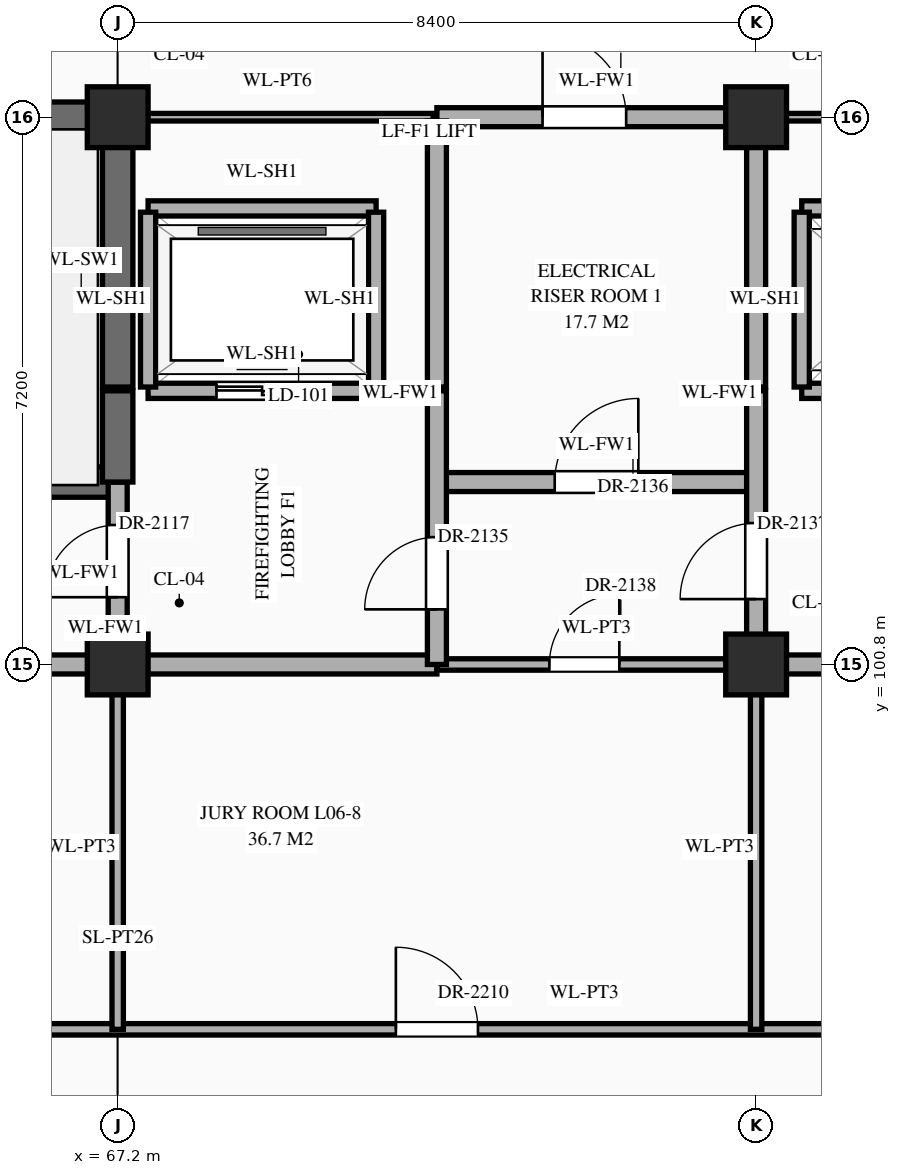
"""IFC4 building model, lengths in metres.
Left out: names, types, materials, properties, quantities, classifications, styles, units other than length and angle.
Written with IfcOpenShell. Run it as: python <this file> out.ifc"""

import sys

from ifc_helpers import new_model, si_unit, direction, frame, frame_2d, origin, origin_2d, place, context, subcontext, project, spatial, rectangle, extrude, element, fill, save


model = new_model("IFC4")
c1 = context("Model", 3, precision=1e-05, world=origin(), true_north=direction((0.0, 1.0)))
c2 = subcontext(c1, "Body", "Model", "MODEL_VIEW")
j1 = project(units=[si_unit("LENGTHUNIT", "METRE"), si_unit("PLANEANGLEUNIT", "RADIAN")], contexts=[c1])
p1 = place(None, origin())
s1 = spatial("IfcSite", under=j1, at=p1, CompositionType="ELEMENT")
p2 = place(p1, origin())
s2 = spatial("IfcBuilding", under=s1, at=p2, CompositionType="ELEMENT")
p3 = place(p2, frame((0.0, 0.0, 26.1)))
s3 = spatial("IfcBuildingStorey", under=s2, at=p3, CompositionType="ELEMENT", Elevation=26.1)
for number, where, z_axis, x_axis in (
    (1, (67.2, 100.8, 0.0), (0.0, 0.0, 1.0), (1.0, 0.0, 0.0)),
    (2, (67.2, 108.0, 0.0), (0.0, 0.0, 1.0), (1.0, 0.0, 0.0)),
    (3, (75.6, 100.8, 0.0), (0.0, 0.0, 1.0), (1.0, 0.0, 0.0)),
    (4, (75.6, 108.0, 0.0), (0.0, 0.0, 1.0), (1.0, 0.0, 0.0)),
):
    element("IfcColumn", number, at=place(p3, frame(where, z_axis=z_axis, x_axis=x_axis)), inside=s3, PredefinedType="COLUMN", context=c2, shape_type="SweptSolid", body=[
        extrude(rectangle(XDim=0.8, YDim=0.8, at=origin_2d()), origin(), (0.0, 0.0, 1.0), 4.5),
    ])
p4 = place(p3, frame((56.2, 96.0, 0.0), z_axis=(0.0, 0.0, 1.0), x_axis=(1.0, 0.0, 0.0)))
e5 = element("IfcWall", 5, at=p4, inside=s3, PredefinedType="STANDARD", context=c2, shape_type="SweptSolid", body=[
    extrude(rectangle(XDim=27.8, YDim=0.15, at=frame_2d((13.9, 0.0))), origin(), (0.0, 0.0, 1.0), 4.24),
])
p5 = place(p4, frame((0.8, 0.0, 0.0)))
e6 = element("IfcOpeningElement", 6, at=p5, cuts=e5, PredefinedType="OPENING", context=c2, shape_type="SweptSolid", body=[
    extrude(rectangle(XDim=1.0, YDim=2.25, at=frame_2d((0.5, 1.125))), frame((0.0, 0.087, 0.0), z_axis=(0.0, -1.0, 0.0), x_axis=(1.0, 0.0, 0.0)), (0.0, 0.0, 1.0), 0.174),
])
p6 = place(p4, frame((6.28, 0.0, 0.0)))
e7 = element("IfcOpeningElement", 7, at=p6, cuts=e5, PredefinedType="OPENING", context=c2, shape_type="SweptSolid", body=[
    extrude(rectangle(XDim=1.04, YDim=2.2, at=frame_2d((0.52, 1.1))), frame((0.0, 0.087, 0.0), z_axis=(0.0, -1.0, 0.0), x_axis=(1.0, 0.0, 0.0)), (0.0, 0.0, 1.0), 0.174),
])
p7 = place(p4, frame((14.66, 0.0, 0.0)))
e8 = element("IfcOpeningElement", 8, at=p7, cuts=e5, PredefinedType="OPENING", context=c2, shape_type="SweptSolid", body=[
    extrude(rectangle(XDim=1.08, YDim=2.25, at=frame_2d((0.54, 1.125))), frame((0.0, 0.087, 0.0), z_axis=(0.0, -1.0, 0.0), x_axis=(1.0, 0.0, 0.0)), (0.0, 0.0, 1.0), 0.174),
])
p8 = place(p4, frame((23.04, 0.0, 0.0)))
e9 = element("IfcOpeningElement", 9, at=p8, cuts=e5, PredefinedType="OPENING", context=c2, shape_type="SweptSolid", body=[
    extrude(rectangle(XDim=1.12, YDim=2.25, at=frame_2d((0.56, 1.125))), frame((0.0, 0.087, 0.0), z_axis=(0.0, -1.0, 0.0), x_axis=(1.0, 0.0, 0.0)), (0.0, 0.0, 1.0), 0.174),
])
p9 = place(p3, frame((58.8, 100.8, 0.0), z_axis=(0.0, 0.0, 1.0), x_axis=(1.0, 0.0, 0.0)))
e10 = element("IfcWall", 10, at=p9, inside=s3, PredefinedType="STANDARD", context=c2, shape_type="SweptSolid", body=[
    extrude(rectangle(XDim=12.6, YDim=0.25, at=frame_2d((6.3, 0.0))), origin(), (0.0, 0.0, 1.0), 3.39),
])
p10 = place(p9, frame((3.7, 0.0, 0.0)))
e11 = element("IfcOpeningElement", 11, at=p10, cuts=e10, PredefinedType="OPENING", context=c2, shape_type="SweptSolid", body=[
    extrude(rectangle(XDim=1.0, YDim=2.2, at=frame_2d((0.5, 1.1))), frame((0.0, 0.137, 0.0), z_axis=(0.0, -1.0, 0.0), x_axis=(1.0, 0.0, 0.0)), (0.0, 0.0, 1.0), 0.274),
])
p11 = place(p3, frame((71.4, 100.8, 0.0), z_axis=(0.0, 0.0, 1.0), x_axis=(1.0, 0.0, 0.0)))
e12 = element("IfcWall", 12, at=p11, inside=s3, PredefinedType="STANDARD", context=c2, shape_type="SweptSolid", body=[
    extrude(rectangle(XDim=4.2, YDim=0.15, at=frame_2d((2.1, 0.0))), origin(), (0.0, 0.0, 1.0), 3.39),
])
p12 = place(p11, frame((1.48, 0.0, 0.0)))
e13 = element("IfcOpeningElement", 13, at=p12, cuts=e12, PredefinedType="OPENING", context=c2, shape_type="SweptSolid", body=[
    extrude(rectangle(XDim=0.92, YDim=2.15, at=frame_2d((0.46, 1.075))), frame((0.0, 0.087, 0.0), z_axis=(0.0, -1.0, 0.0), x_axis=(1.0, 0.0, 0.0)), (0.0, 0.0, 1.0), 0.174),
])
p13 = place(p3, frame((75.6, 100.8, 0.0), z_axis=(0.0, 0.0, 1.0), x_axis=(1.0, 0.0, 0.0)))
e14 = element("IfcWall", 14, at=p13, inside=s3, PredefinedType="STANDARD", context=c2, shape_type="SweptSolid", body=[
    extrude(rectangle(XDim=16.8, YDim=0.25, at=frame_2d((8.4, 0.0))), origin(), (0.0, 0.0, 1.0), 3.39),
])
p14 = place(p13, frame((3.725, 0.0, 0.0)))
e15 = element("IfcOpeningElement", 15, at=p14, cuts=e14, PredefinedType="OPENING", context=c2, shape_type="SweptSolid", body=[
    extrude(rectangle(XDim=0.95, YDim=2.15, at=frame_2d((0.475, 1.075))), frame((0.0, 0.137, 0.0), z_axis=(0.0, -1.0, 0.0), x_axis=(1.0, 0.0, 0.0)), (0.0, 0.0, 1.0), 0.274),
])
p15 = place(p13, frame((9.76, 0.0, 0.0)))
e16 = element("IfcOpeningElement", 16, at=p15, cuts=e14, PredefinedType="OPENING", context=c2, shape_type="SweptSolid", body=[
    extrude(rectangle(XDim=1.0, YDim=2.2, at=frame_2d((0.5, 1.1))), frame((0.0, 0.137, 0.0), z_axis=(0.0, -1.0, 0.0), x_axis=(1.0, 0.0, 0.0)), (0.0, 0.0, 1.0), 0.274),
])
p16 = place(p13, frame((12.525, 0.0, 0.0)))
e17 = element("IfcOpeningElement", 17, at=p16, cuts=e14, PredefinedType="OPENING", context=c2, shape_type="SweptSolid", body=[
    extrude(rectangle(XDim=0.95, YDim=2.15, at=frame_2d((0.475, 1.075))), frame((0.0, 0.137, 0.0), z_axis=(0.0, -1.0, 0.0), x_axis=(1.0, 0.0, 0.0)), (0.0, 0.0, 1.0), 0.274),
])
p17 = place(p13, frame((14.79, 0.0, 0.0)))
e18 = element("IfcOpeningElement", 18, at=p17, cuts=e14, PredefinedType="OPENING", context=c2, shape_type="SweptSolid", body=[
    extrude(rectangle(XDim=1.1, YDim=2.2, at=frame_2d((0.55, 1.1))), frame((0.0, 0.137, 0.0), z_axis=(0.0, -1.0, 0.0), x_axis=(1.0, 0.0, 0.0)), (0.0, 0.0, 1.0), 0.274),
])
p18 = place(p3, frame((58.8, 103.2, 0.0), z_axis=(0.0, 0.0, 1.0), x_axis=(1.0, 0.0, 0.0)))
e19 = element("IfcWall", 19, at=p18, inside=s3, PredefinedType="SHEAR", context=c2, shape_type="SweptSolid", body=[
    extrude(rectangle(XDim=8.4, YDim=0.4, at=frame_2d((4.2, 0.0))), origin(), (0.0, 0.0, 1.0), 4.24),
])
p19 = place(p18, frame((0.65, 0.0, 0.0)))
e20 = element("IfcOpeningElement", 20, at=p19, cuts=e19, PredefinedType="OPENING", context=c2, shape_type="SweptSolid", body=[
    extrude(rectangle(XDim=1.1, YDim=2.2, at=frame_2d((0.55, 1.1))), frame((0.0, 0.212, 0.0), z_axis=(0.0, -1.0, 0.0), x_axis=(1.0, 0.0, 0.0)), (0.0, 0.0, 1.0), 0.424),
])
p20 = place(p3, frame((71.4, 103.2, 0.0), z_axis=(0.0, 0.0, 1.0), x_axis=(1.0, 0.0, 0.0)))
e21 = element("IfcWall", 21, at=p20, inside=s3, PredefinedType="STANDARD", context=c2, shape_type="SweptSolid", body=[
    extrude(rectangle(XDim=4.2, YDim=0.25, at=frame_2d((2.1, 0.0))), origin(), (0.0, 0.0, 1.0), 4.24),
])
p21 = place(p20, frame((1.55, 0.0, 0.0)))
e22 = element("IfcOpeningElement", 22, at=p21, cuts=e21, PredefinedType="OPENING", context=c2, shape_type="SweptSolid", body=[
    extrude(rectangle(XDim=1.1, YDim=2.2, at=frame_2d((0.55, 1.1))), frame((0.0, 0.137, 0.0), z_axis=(0.0, -1.0, 0.0), x_axis=(1.0, 0.0, 0.0)), (0.0, 0.0, 1.0), 0.274),
])
p22 = place(p3, frame((67.6, 104.4, 0.0), z_axis=(0.0, 0.0, 1.0), x_axis=(1.0, 0.0, 0.0)))
e23 = element("IfcWall", 23, at=p22, inside=s3, PredefinedType="STANDARD", context=c2, shape_type="SweptSolid", body=[
    extrude(rectangle(XDim=3.0, YDim=0.2, at=frame_2d((1.5, 0.0))), origin(), (0.0, 0.0, 1.0), 4.24),
])
p23 = place(p22, frame((0.9, 0.0, 0.0)))
e24 = element("IfcOpeningElement", 24, at=p23, cuts=e23, PredefinedType="OPENING", context=c2, shape_type="SweptSolid", body=[
    extrude(rectangle(XDim=1.2, YDim=2.15, at=frame_2d((0.6, 1.075))), frame((0.0, 0.112, 0.0), z_axis=(0.0, -1.0, 0.0), x_axis=(1.0, 0.0, 0.0)), (0.0, 0.0, 1.0), 0.224),
])
p24 = place(p3, frame((76.2, 104.4, 0.0), z_axis=(0.0, 0.0, 1.0), x_axis=(1.0, 0.0, 0.0)))
e25 = element("IfcWall", 25, at=p24, inside=s3, PredefinedType="STANDARD", context=c2, shape_type="SweptSolid", body=[
    extrude(rectangle(XDim=2.4, YDim=0.2, at=frame_2d((1.2, 0.0))), origin(), (0.0, 0.0, 1.0), 4.24),
])
p25 = place(p24, frame((0.7, 0.0, 0.0)))
e26 = element("IfcOpeningElement", 26, at=p25, cuts=e25, PredefinedType="OPENING", context=c2, shape_type="SweptSolid", body=[
    extrude(rectangle(XDim=1.0, YDim=2.15, at=frame_2d((0.5, 1.075))), frame((0.0, 0.112, 0.0), z_axis=(0.0, -1.0, 0.0), x_axis=(1.0, 0.0, 0.0)), (0.0, 0.0, 1.0), 0.224),
])
p26 = place(p3, frame((67.6, 106.8, 0.0), z_axis=(0.0, 0.0, 1.0), x_axis=(1.0, 0.0, 0.0)))
e27 = element("IfcWall", 27, at=p26, inside=s3, PredefinedType="STANDARD", context=c2, shape_type="SweptSolid", body=[
    extrude(rectangle(XDim=3.0, YDim=0.2, at=frame_2d((1.5, 0.0))), origin(), (0.0, 0.0, 1.0), 4.24),
])
p27 = place(p3, frame((76.2, 106.8, 0.0), z_axis=(0.0, 0.0, 1.0), x_axis=(1.0, 0.0, 0.0)))
e28 = element("IfcWall", 28, at=p27, inside=s3, PredefinedType="STANDARD", context=c2, shape_type="SweptSolid", body=[
    extrude(rectangle(XDim=2.4, YDim=0.2, at=frame_2d((1.2, 0.0))), origin(), (0.0, 0.0, 1.0), 4.24),
])
p28 = place(p3, frame((58.8, 108.0, 0.0), z_axis=(0.0, 0.0, 1.0), x_axis=(1.0, 0.0, 0.0)))
e29 = element("IfcWall", 29, at=p28, inside=s3, PredefinedType="SHEAR", context=c2, shape_type="SweptSolid", body=[
    extrude(rectangle(XDim=8.4, YDim=0.4, at=frame_2d((4.2, 0.0))), origin(), (0.0, 0.0, 1.0), 4.24),
])
p29 = place(p3, frame((67.25, 108.0, 0.0), z_axis=(0.0, 0.0, 1.0), x_axis=(1.0, 0.0, 0.0)))
e30 = element("IfcWall", 30, at=p29, inside=s3, PredefinedType="STANDARD", context=c2, shape_type="SweptSolid", body=[
    extrude(rectangle(XDim=4.1, YDim=0.1, at=frame_2d((2.05, 0.0))), origin(), (0.0, 0.0, 1.0), 3.39),
])
p30 = place(p3, frame((71.4, 108.0, 0.0), z_axis=(0.0, 0.0, 1.0), x_axis=(1.0, 0.0, 0.0)))
e31 = element("IfcWall", 31, at=p30, inside=s3, PredefinedType="STANDARD", context=c2, shape_type="SweptSolid", body=[
    extrude(rectangle(XDim=4.2, YDim=0.25, at=frame_2d((2.1, 0.0))), origin(), (0.0, 0.0, 1.0), 3.39),
])
p31 = place(p30, frame((1.39, 0.0, 0.0)))
e32 = element("IfcOpeningElement", 32, at=p31, cuts=e31, PredefinedType="OPENING", context=c2, shape_type="SweptSolid", body=[
    extrude(rectangle(XDim=1.1, YDim=2.2, at=frame_2d((0.55, 1.1))), frame((0.0, 0.137, 0.0), z_axis=(0.0, -1.0, 0.0), x_axis=(1.0, 0.0, 0.0)), (0.0, 0.0, 1.0), 0.274),
])
p32 = place(p3, frame((75.65, 108.0, 0.0), z_axis=(0.0, 0.0, 1.0), x_axis=(1.0, 0.0, 0.0)))
e33 = element("IfcWall", 33, at=p32, inside=s3, PredefinedType="STANDARD", context=c2, shape_type="SweptSolid", body=[
    extrude(rectangle(XDim=6.15, YDim=0.1, at=frame_2d((3.075, 0.0))), origin(), (0.0, 0.0, 1.0), 3.39),
])
p33 = place(p3, frame((67.2, 96.0, 0.0), z_axis=(0.0, 0.0, 1.0), x_axis=(0.0, 1.0, 0.0)))
e34 = element("IfcWall", 34, at=p33, inside=s3, PredefinedType="STANDARD", context=c2, shape_type="SweptSolid", body=[
    extrude(rectangle(XDim=4.8, YDim=0.15, at=frame_2d((2.4, 0.0))), origin(), (0.0, 0.0, 1.0), 3.49),
])
p34 = place(p3, frame((67.2, 100.8, 0.0), z_axis=(0.0, 0.0, 1.0), x_axis=(0.0, 1.0, 0.0)))
e35 = element("IfcWall", 35, at=p34, inside=s3, PredefinedType="STANDARD", context=c2, shape_type="SweptSolid", body=[
    extrude(rectangle(XDim=2.4, YDim=0.25, at=frame_2d((1.2, 0.0))), origin(), (0.0, 0.0, 1.0), 3.49),
])
p35 = place(p34, frame((0.885, 0.0, 0.0)))
e36 = element("IfcOpeningElement", 36, at=p35, cuts=e35, PredefinedType="OPENING", context=c2, shape_type="SweptSolid", body=[
    extrude(rectangle(XDim=0.95, YDim=2.15, at=frame_2d((0.475, 1.075))), frame((0.0, 0.137, 0.0), z_axis=(0.0, -1.0, 0.0), x_axis=(1.0, 0.0, 0.0)), (0.0, 0.0, 1.0), 0.274),
])
p36 = place(p3, frame((67.2, 103.2, 0.0), z_axis=(0.0, 0.0, 1.0), x_axis=(0.0, 1.0, 0.0)))
e37 = element("IfcWall", 37, at=p36, inside=s3, PredefinedType="SHEAR", context=c2, shape_type="SweptSolid", body=[
    extrude(rectangle(XDim=1.2, YDim=0.4, at=frame_2d((0.6, 0.0))), origin(), (0.0, 0.0, 1.0), 4.24),
])
p37 = place(p3, frame((67.2, 104.45, 0.0), z_axis=(0.0, 0.0, 1.0), x_axis=(0.0, 1.0, 0.0)))
e38 = element("IfcWall", 38, at=p37, inside=s3, PredefinedType="SHEAR", context=c2, shape_type="SweptSolid", body=[
    extrude(rectangle(XDim=3.5, YDim=0.4, at=frame_2d((1.75, 0.0))), origin(), (0.0, 0.0, 1.0), 4.24),
])
for number, where, z_axis, x_axis in (
    (39, (67.6, 104.45, 0.0), (0.0, 0.0, 1.0), (0.0, 1.0, 0.0)),
    (40, (70.6, 104.45, 0.0), (0.0, 0.0, 1.0), (0.0, 1.0, 0.0)),
):
    element("IfcWall", number, at=place(p3, frame(where, z_axis=z_axis, x_axis=x_axis)), inside=s3, PredefinedType="STANDARD", context=c2, shape_type="SweptSolid", body=[
        extrude(rectangle(XDim=2.3, YDim=0.2, at=frame_2d((1.15, 0.0))), origin(), (0.0, 0.0, 1.0), 4.24),
    ])
p38 = place(p3, frame((71.4, 100.8, 0.0), z_axis=(0.0, 0.0, 1.0), x_axis=(0.0, 1.0, 0.0)))
e41 = element("IfcWall", 41, at=p38, inside=s3, PredefinedType="STANDARD", context=c2, shape_type="SweptSolid", body=[
    extrude(rectangle(XDim=3.6, YDim=0.25, at=frame_2d((1.8, 0.0))), origin(), (0.0, 0.0, 1.0), 3.89),
])
p39 = place(p38, frame((0.725, 0.0, 0.0)))
e42 = element("IfcOpeningElement", 42, at=p39, cuts=e41, PredefinedType="OPENING", context=c2, shape_type="SweptSolid", body=[
    extrude(rectangle(XDim=0.95, YDim=2.15, at=frame_2d((0.475, 1.075))), frame((0.0, 0.137, 0.0), z_axis=(0.0, -1.0, 0.0), x_axis=(1.0, 0.0, 0.0)), (0.0, 0.0, 1.0), 0.274),
])
p40 = place(p3, frame((71.4, 104.45, 0.0), z_axis=(0.0, 0.0, 1.0), x_axis=(0.0, 1.0, 0.0)))
e43 = element("IfcWall", 43, at=p40, inside=s3, PredefinedType="STANDARD", context=c2, shape_type="SweptSolid", body=[
    extrude(rectangle(XDim=3.5, YDim=0.25, at=frame_2d((1.75, 0.0))), origin(), (0.0, 0.0, 1.0), 3.89),
])
p41 = place(p3, frame((75.6, 96.0, 0.0), z_axis=(0.0, 0.0, 1.0), x_axis=(0.0, 1.0, 0.0)))
e44 = element("IfcWall", 44, at=p41, inside=s3, PredefinedType="STANDARD", context=c2, shape_type="SweptSolid", body=[
    extrude(rectangle(XDim=4.8, YDim=0.15, at=frame_2d((2.4, 0.0))), origin(), (0.0, 0.0, 1.0), 3.49),
])
p42 = place(p3, frame((75.6, 100.8, 0.0), z_axis=(0.0, 0.0, 1.0), x_axis=(0.0, 1.0, 0.0)))
e45 = element("IfcWall", 45, at=p42, inside=s3, PredefinedType="STANDARD", context=c2, shape_type="SweptSolid", body=[
    extrude(rectangle(XDim=3.6, YDim=0.25, at=frame_2d((1.8, 0.0))), origin(), (0.0, 0.0, 1.0), 3.49),
])
p43 = place(p42, frame((0.86, 0.0, 0.0)))
e46 = element("IfcOpeningElement", 46, at=p43, cuts=e45, PredefinedType="OPENING", context=c2, shape_type="SweptSolid", body=[
    extrude(rectangle(XDim=1.0, YDim=2.2, at=frame_2d((0.5, 1.1))), frame((0.0, 0.137, 0.0), z_axis=(0.0, -1.0, 0.0), x_axis=(1.0, 0.0, 0.0)), (0.0, 0.0, 1.0), 0.274),
])
p44 = place(p3, frame((75.6, 104.45, 0.0), z_axis=(0.0, 0.0, 1.0), x_axis=(0.0, 1.0, 0.0)))
e47 = element("IfcWall", 47, at=p44, inside=s3, PredefinedType="STANDARD", context=c2, shape_type="SweptSolid", body=[
    extrude(rectangle(XDim=3.5, YDim=0.25, at=frame_2d((1.75, 0.0))), origin(), (0.0, 0.0, 1.0), 3.49),
])
p45 = place(p3, frame((76.2, 104.45, 0.0), z_axis=(0.0, 0.0, 1.0), x_axis=(0.0, 1.0, 0.0)))
e48 = element("IfcWall", 48, at=p45, inside=s3, PredefinedType="STANDARD", context=c2, shape_type="SweptSolid", body=[
    extrude(rectangle(XDim=2.3, YDim=0.2, at=frame_2d((1.15, 0.0))), origin(), (0.0, 0.0, 1.0), 4.24),
])
p46 = place(p23, origin())
e49 = element("IfcDoor", 49, at=p46, inside=s3, OperationType="DOUBLE_DOOR_SLIDING", PredefinedType="DOOR", context=c2, shape_type="SweptSolid", body=[
    extrude(rectangle(XDim=1.2, YDim=2.15, at=frame_2d((0.6, 1.075))), frame((0.0, 0.025, 0.0), z_axis=(0.0, -1.0, 0.0), x_axis=(1.0, 0.0, 0.0)), (0.0, 0.0, 1.0), 0.05),
])
fill(e24, e49)
p47 = place(p35, origin())
e50 = element("IfcDoor", 50, at=p47, inside=s3, OperationType="SINGLE_SWING_LEFT", PredefinedType="DOOR", context=c2, shape_type="SweptSolid", body=[
    extrude(rectangle(XDim=0.95, YDim=2.15, at=frame_2d((0.475, 1.075))), frame((0.0, 0.025, 0.0), z_axis=(0.0, -1.0, 0.0), x_axis=(1.0, 0.0, 0.0)), (0.0, 0.0, 1.0), 0.05),
])
fill(e36, e50)
p48 = place(p39, origin())
e51 = element("IfcDoor", 51, at=p48, inside=s3, OperationType="SINGLE_SWING_LEFT", PredefinedType="DOOR", context=c2, shape_type="SweptSolid", body=[
    extrude(rectangle(XDim=0.95, YDim=2.15, at=frame_2d((0.475, 1.075))), frame((0.0, 0.025, 0.0), z_axis=(0.0, -1.0, 0.0), x_axis=(1.0, 0.0, 0.0)), (0.0, 0.0, 1.0), 0.05),
])
fill(e42, e51)
p49 = place(p21, origin())
e52 = element("IfcDoor", 52, at=p49, inside=s3, OperationType="SINGLE_SWING_RIGHT", PredefinedType="DOOR", context=c2, shape_type="SweptSolid", body=[
    extrude(rectangle(XDim=1.1, YDim=2.2, at=frame_2d((0.55, 1.1))), frame((0.0, 0.025, 0.0), z_axis=(0.0, -1.0, 0.0), x_axis=(1.0, 0.0, 0.0)), (0.0, 0.0, 1.0), 0.05),
])
fill(e22, e52)
p50 = place(p43, origin())
e53 = element("IfcDoor", 53, at=p50, inside=s3, OperationType="SINGLE_SWING_LEFT", PredefinedType="DOOR", context=c2, shape_type="SweptSolid", body=[
    extrude(rectangle(XDim=1.0, YDim=2.2, at=frame_2d((0.5, 1.1))), frame((0.0, 0.025, 0.0), z_axis=(0.0, -1.0, 0.0), x_axis=(1.0, 0.0, 0.0)), (0.0, 0.0, 1.0), 0.05),
])
fill(e46, e53)
p51 = place(p12, origin())
e54 = element("IfcDoor", 54, at=p51, inside=s3, OperationType="SINGLE_SWING_RIGHT", PredefinedType="DOOR", context=c2, shape_type="SweptSolid", body=[
    extrude(rectangle(XDim=0.92, YDim=2.15, at=frame_2d((0.46, 1.075))), frame((0.0, 0.025, 0.0), z_axis=(0.0, -1.0, 0.0), x_axis=(1.0, 0.0, 0.0)), (0.0, 0.0, 1.0), 0.05),
])
fill(e13, e54)
p52 = place(p31, origin())
e55 = element("IfcDoor", 55, at=p52, inside=s3, OperationType="SINGLE_SWING_LEFT", PredefinedType="DOOR", context=c2, shape_type="SweptSolid", body=[
    extrude(rectangle(XDim=1.1, YDim=2.2, at=frame_2d((0.55, 1.1))), frame((0.0, 0.025, 0.0), z_axis=(0.0, -1.0, 0.0), x_axis=(1.0, 0.0, 0.0)), (0.0, 0.0, 1.0), 0.05),
])
fill(e32, e55)
p53 = place(p7, origin())
e56 = element("IfcDoor", 56, at=p53, inside=s3, OperationType="SINGLE_SWING_LEFT", PredefinedType="DOOR", context=c2, shape_type="SweptSolid", body=[
    extrude(rectangle(XDim=1.08, YDim=2.25, at=frame_2d((0.54, 1.125))), frame((0.0, 0.025, 0.0), z_axis=(0.0, -1.0, 0.0), x_axis=(1.0, 0.0, 0.0)), (0.0, 0.0, 1.0), 0.05),
])
fill(e8, e56)
save(model, sys.argv[1])
